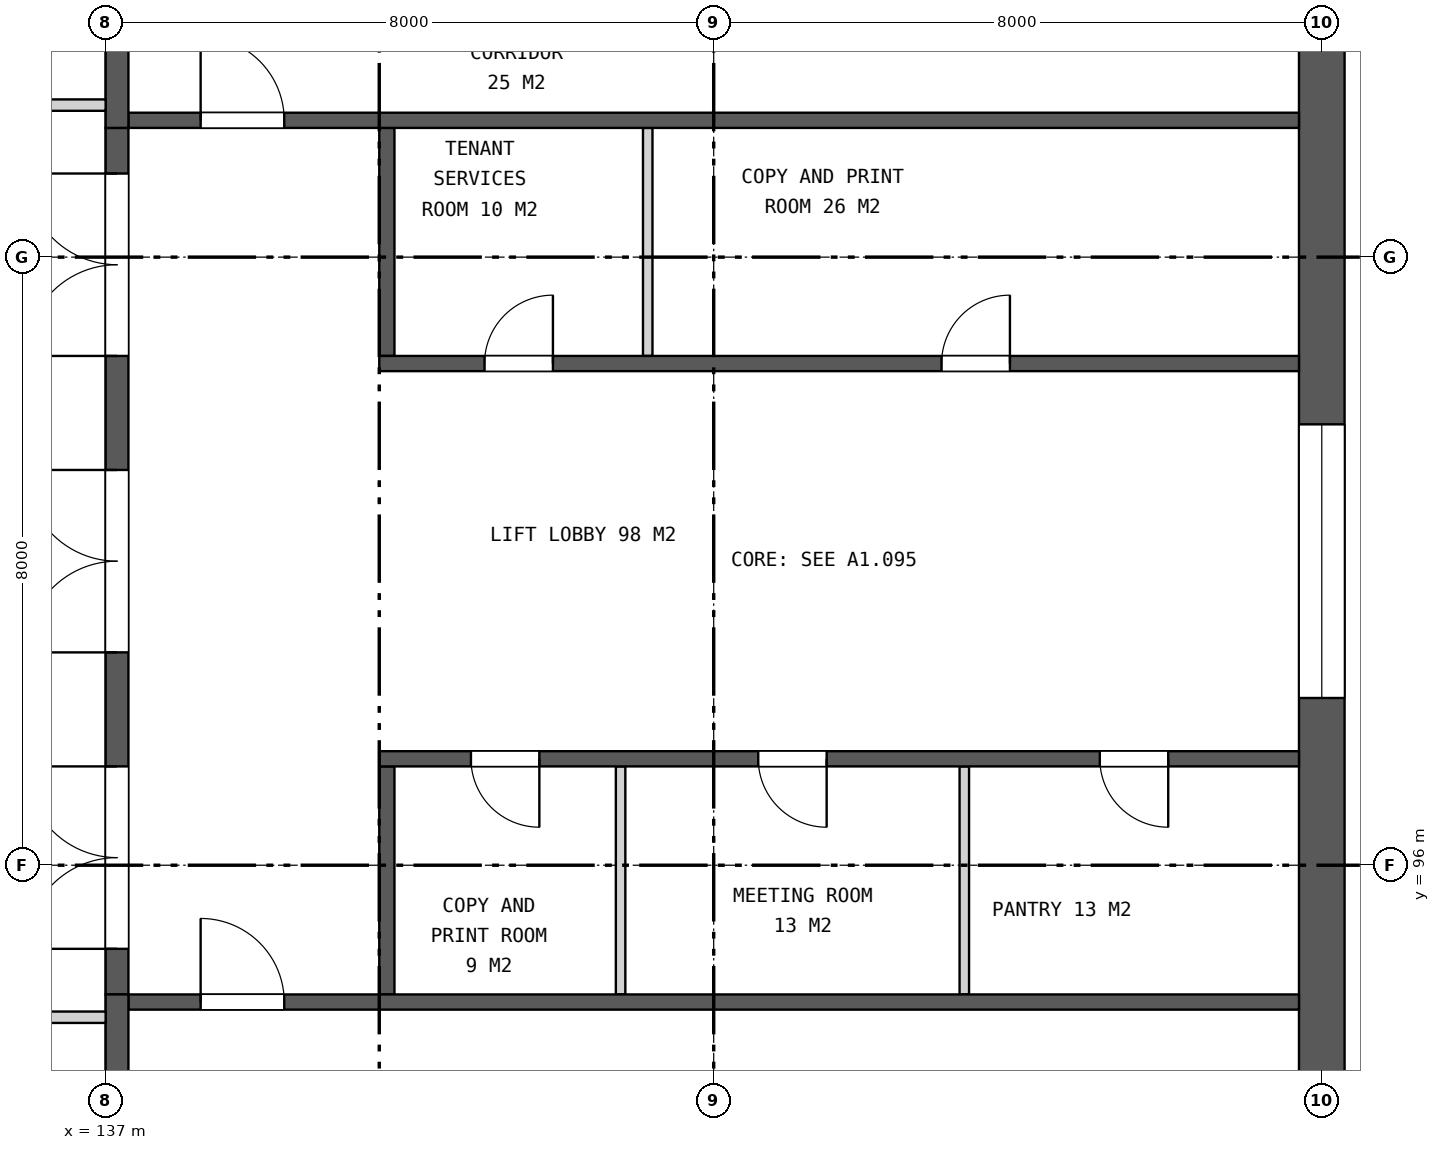
"""IFC4 building model, lengths in metres.
Left out: names, types, materials, properties, quantities, classifications, styles, units other than length and angle.
Written with IfcOpenShell. Run it as: python <this file> out.ifc"""

import sys

from ifc_helpers import new_model, si_unit, direction, frame, frame_2d, origin, place, context, subcontext, project, spatial, rectangle, extrude, element, fill, save


model = new_model("IFC4")
c1 = context("Model", 3, precision=1e-05, world=origin(), true_north=direction((0.0, 1.0)))
c2 = subcontext(c1, "Body", "Model", "MODEL_VIEW")
j1 = project(units=[si_unit("LENGTHUNIT", "METRE"), si_unit("PLANEANGLEUNIT", "RADIAN")], contexts=[c1])
p1 = place(None, origin())
s1 = spatial("IfcSite", under=j1, at=p1, CompositionType="ELEMENT")
p2 = place(p1, origin())
s2 = spatial("IfcBuilding", under=s1, at=p2, CompositionType="ELEMENT")
p3 = place(p2, frame((0.0, 0.0, 233.5)))
s3 = spatial("IfcBuildingStorey", under=s2, at=p3, CompositionType="ELEMENT", Elevation=233.5)
p4 = place(p3, frame((153.0, 88.3, 0.0), z_axis=(0.0, 0.0, 1.0), x_axis=(0.0, 1.0, 0.0)))
e1 = element("IfcWall", 1, at=p4, inside=s3, PredefinedType="SHEAR", context=c2, shape_type="SweptSolid", body=[
    extrude(rectangle(XDim=23.4, YDim=0.6, at=frame_2d((11.7, 0.0))), origin(), (0.0, 0.0, 1.0), 4.2),
])
p5 = place(p4, frame((9.9, 0.0, 0.15)))
e2 = element("IfcOpeningElement", 2, at=p5, cuts=e1, PredefinedType="OPENING", context=c2, shape_type="SweptSolid", body=[
    extrude(rectangle(XDim=3.6, YDim=3.0, at=frame_2d((1.8, 1.5))), frame((0.0, 0.31, 0.0), z_axis=(0.0, -1.0, 0.0), x_axis=(1.0, 0.0, 0.0)), (0.0, 0.0, 1.0), 0.62),
])
p6 = place(p3, frame((137.15, 94.3, 0.0), z_axis=(0.0, 0.0, 1.0), x_axis=(0.0, 1.0, 0.0)))
e3 = element("IfcWall", 3, at=p6, inside=s3, PredefinedType="SHEAR", context=c2, shape_type="SweptSolid", body=[
    extrude(rectangle(XDim=11.4, YDim=0.3, at=frame_2d((5.7, 0.0))), origin(), (0.0, 0.0, 1.0), 4.2),
])
p7 = place(p6, frame((0.6, 0.0, 0.0)))
e4 = element("IfcOpeningElement", 4, at=p7, cuts=e3, PredefinedType="OPENING", context=c2, shape_type="SweptSolid", body=[
    extrude(rectangle(XDim=2.4, YDim=2.4, at=frame_2d((1.2, 1.2))), frame((0.0, 0.16, 0.0), z_axis=(0.0, -1.0, 0.0), x_axis=(1.0, 0.0, 0.0)), (0.0, 0.0, 1.0), 0.32),
])
p8 = place(p6, frame((4.5, 0.0, 0.0)))
e5 = element("IfcOpeningElement", 5, at=p8, cuts=e3, PredefinedType="OPENING", context=c2, shape_type="SweptSolid", body=[
    extrude(rectangle(XDim=2.4, YDim=2.4, at=frame_2d((1.2, 1.2))), frame((0.0, 0.16, 0.0), z_axis=(0.0, -1.0, 0.0), x_axis=(1.0, 0.0, 0.0)), (0.0, 0.0, 1.0), 0.32),
])
p9 = place(p6, frame((8.4, 0.0, 0.0)))
e6 = element("IfcOpeningElement", 6, at=p9, cuts=e3, PredefinedType="OPENING", context=c2, shape_type="SweptSolid", body=[
    extrude(rectangle(XDim=2.4, YDim=2.4, at=frame_2d((1.2, 1.2))), frame((0.0, 0.16, 0.0), z_axis=(0.0, -1.0, 0.0), x_axis=(1.0, 0.0, 0.0)), (0.0, 0.0, 1.0), 0.32),
])
p10 = place(p3, frame((140.7, 102.7, 0.0), z_axis=(0.0, 0.0, 1.0), x_axis=(0.0, 1.0, 0.0)))
e7 = element("IfcWall", 7, at=p10, inside=s3, PredefinedType="SHEAR", context=c2, shape_type="SweptSolid", body=[
    extrude(rectangle(XDim=3.0, YDim=0.2, at=frame_2d((1.5, 0.0))), origin(), (0.0, 0.0, 1.0), 4.2),
])
p11 = place(p3, frame((144.132, 102.7, 0.0), z_axis=(0.0, 0.0, 1.0), x_axis=(0.0, 1.0, 0.0)))
e8 = element("IfcWall", 8, at=p11, inside=s3, PredefinedType="PARTITIONING", context=c2, shape_type="SweptSolid", body=[
    extrude(rectangle(XDim=3.0, YDim=0.125, at=frame_2d((1.5, 0.0))), origin(), (0.0, 0.0, 1.0), 4.2),
])
p12 = place(p3, frame((140.6, 102.6, 0.0), z_axis=(0.0, 0.0, 1.0), x_axis=(1.0, 0.0, 0.0)))
e9 = element("IfcWall", 9, at=p12, inside=s3, PredefinedType="SHEAR", context=c2, shape_type="SweptSolid", body=[
    extrude(rectangle(XDim=12.1, YDim=0.2, at=frame_2d((6.05, 0.0))), origin(), (0.0, 0.0, 1.0), 4.2),
])
p13 = place(p12, frame((1.385, 0.0, 0.0)))
e10 = element("IfcOpeningElement", 10, at=p13, cuts=e9, PredefinedType="OPENING", context=c2, shape_type="SweptSolid", body=[
    extrude(rectangle(XDim=0.9, YDim=2.1, at=frame_2d((0.45, 1.05))), frame((0.0, 0.11, 0.0), z_axis=(0.0, -1.0, 0.0), x_axis=(1.0, 0.0, 0.0)), (0.0, 0.0, 1.0), 0.22),
])
p14 = place(p12, frame((7.397, 0.0, 0.0)))
e11 = element("IfcOpeningElement", 11, at=p14, cuts=e9, PredefinedType="OPENING", context=c2, shape_type="SweptSolid", body=[
    extrude(rectangle(XDim=0.9, YDim=2.1, at=frame_2d((0.45, 1.05))), frame((0.0, 0.11, 0.0), z_axis=(0.0, -1.0, 0.0), x_axis=(1.0, 0.0, 0.0)), (0.0, 0.0, 1.0), 0.22),
])
p15 = place(p3, frame((140.7, 94.3, 0.0), z_axis=(0.0, 0.0, 1.0), x_axis=(0.0, 1.0, 0.0)))
e12 = element("IfcWall", 12, at=p15, inside=s3, PredefinedType="SHEAR", context=c2, shape_type="SweptSolid", body=[
    extrude(rectangle(XDim=3.0, YDim=0.2, at=frame_2d((1.5, 0.0))), origin(), (0.0, 0.0, 1.0), 4.2),
])
for number, where, z_axis, x_axis in (
    (13, (143.775, 94.3, 0.0), (0.0, 0.0, 1.0), (0.0, 1.0, 0.0)),
    (14, (148.297, 94.3, 0.0), (0.0, 0.0, 1.0), (0.0, 1.0, 0.0)),
):
    element("IfcWall", number, at=place(p3, frame(where, z_axis=z_axis, x_axis=x_axis)), inside=s3, PredefinedType="PARTITIONING", context=c2, shape_type="SweptSolid", body=[
        extrude(rectangle(XDim=3.0, YDim=0.125, at=frame_2d((1.5, 0.0))), origin(), (0.0, 0.0, 1.0), 4.2),
    ])
p16 = place(p3, frame((140.6, 97.4, 0.0), z_axis=(0.0, 0.0, 1.0), x_axis=(1.0, 0.0, 0.0)))
e15 = element("IfcWall", 15, at=p16, inside=s3, PredefinedType="SHEAR", context=c2, shape_type="SweptSolid", body=[
    extrude(rectangle(XDim=12.1, YDim=0.2, at=frame_2d((6.05, 0.0))), origin(), (0.0, 0.0, 1.0), 4.2),
])
p17 = place(p16, frame((1.206, 0.0, 0.0)))
e16 = element("IfcOpeningElement", 16, at=p17, cuts=e15, PredefinedType="OPENING", context=c2, shape_type="SweptSolid", body=[
    extrude(rectangle(XDim=0.9, YDim=2.1, at=frame_2d((0.45, 1.05))), frame((0.0, 0.11, 0.0), z_axis=(0.0, -1.0, 0.0), x_axis=(1.0, 0.0, 0.0)), (0.0, 0.0, 1.0), 0.22),
])
p18 = place(p16, frame((4.986, 0.0, 0.0)))
e17 = element("IfcOpeningElement", 17, at=p18, cuts=e15, PredefinedType="OPENING", context=c2, shape_type="SweptSolid", body=[
    extrude(rectangle(XDim=0.9, YDim=2.1, at=frame_2d((0.45, 1.05))), frame((0.0, 0.11, 0.0), z_axis=(0.0, -1.0, 0.0), x_axis=(1.0, 0.0, 0.0)), (0.0, 0.0, 1.0), 0.22),
])
p19 = place(p16, frame((9.48, 0.0, 0.0)))
e18 = element("IfcOpeningElement", 18, at=p19, cuts=e15, PredefinedType="OPENING", context=c2, shape_type="SweptSolid", body=[
    extrude(rectangle(XDim=0.9, YDim=2.1, at=frame_2d((0.45, 1.05))), frame((0.0, 0.11, 0.0), z_axis=(0.0, -1.0, 0.0), x_axis=(1.0, 0.0, 0.0)), (0.0, 0.0, 1.0), 0.22),
])
p20 = place(p3, frame((137.3, 105.8, 0.0), z_axis=(0.0, 0.0, 1.0), x_axis=(1.0, 0.0, 0.0)))
e19 = element("IfcWall", 19, at=p20, inside=s3, PredefinedType="SHEAR", context=c2, shape_type="SweptSolid", body=[
    extrude(rectangle(XDim=15.4, YDim=0.2, at=frame_2d((7.7, 0.0))), origin(), (0.0, 0.0, 1.0), 4.2),
])
p21 = place(p20, frame((0.95, 0.0, 0.0)))
e20 = element("IfcOpeningElement", 20, at=p21, cuts=e19, PredefinedType="OPENING", context=c2, shape_type="SweptSolid", body=[
    extrude(rectangle(XDim=1.1, YDim=2.1, at=frame_2d((0.55, 1.05))), frame((0.0, 0.11, 0.0), z_axis=(0.0, -1.0, 0.0), x_axis=(1.0, 0.0, 0.0)), (0.0, 0.0, 1.0), 0.22),
])
p22 = place(p3, frame((137.15, 105.7, 0.0), z_axis=(0.0, 0.0, 1.0), x_axis=(0.0, 1.0, 0.0)))
e21 = element("IfcWall", 21, at=p22, inside=s3, PredefinedType="SHEAR", context=c2, shape_type="SweptSolid", body=[
    extrude(rectangle(XDim=6.0, YDim=0.3, at=frame_2d((3.0, 0.0))), origin(), (0.0, 0.0, 1.0), 4.2),
])
p23 = place(p3, frame((137.3, 94.2, 0.0), z_axis=(0.0, 0.0, 1.0), x_axis=(1.0, 0.0, 0.0)))
e22 = element("IfcWall", 22, at=p23, inside=s3, PredefinedType="SHEAR", context=c2, shape_type="SweptSolid", body=[
    extrude(rectangle(XDim=15.4, YDim=0.2, at=frame_2d((7.7, 0.0))), origin(), (0.0, 0.0, 1.0), 4.2),
])
p24 = place(p23, frame((0.95, 0.0, 0.0)))
e23 = element("IfcOpeningElement", 23, at=p24, cuts=e22, PredefinedType="OPENING", context=c2, shape_type="SweptSolid", body=[
    extrude(rectangle(XDim=1.1, YDim=2.1, at=frame_2d((0.55, 1.05))), frame((0.0, 0.11, 0.0), z_axis=(0.0, -1.0, 0.0), x_axis=(1.0, 0.0, 0.0)), (0.0, 0.0, 1.0), 0.22),
])
p25 = place(p3, frame((137.15, 88.3, 0.0), z_axis=(0.0, 0.0, 1.0), x_axis=(0.0, 1.0, 0.0)))
e24 = element("IfcWall", 24, at=p25, inside=s3, PredefinedType="SHEAR", context=c2, shape_type="SweptSolid", body=[
    extrude(rectangle(XDim=6.0, YDim=0.3, at=frame_2d((3.0, 0.0))), origin(), (0.0, 0.0, 1.0), 4.2),
])
for number, where, z_axis, x_axis in (
    (25, (131.475, 94.0, 0.0), (0.0, 0.0, 1.0), (1.0, 0.0, 0.0)),
    (26, (131.475, 106.0, 0.0), (0.0, 0.0, 1.0), (1.0, 0.0, 0.0)),
):
    element("IfcWall", number, at=place(p3, frame(where, z_axis=z_axis, x_axis=x_axis)), inside=s3, PredefinedType="PARTITIONING", context=c2, shape_type="SweptSolid", body=[
        extrude(rectangle(XDim=5.525, YDim=0.15, at=frame_2d((2.762, 0.0))), origin(), (0.0, 0.0, 1.0), 3.255),
    ])
p26 = place(p5, origin())
e27 = element("IfcWindow", 27, at=p26, inside=s3, PartitioningType="SINGLE_PANEL", PredefinedType="WINDOW", context=c2, shape_type="SweptSolid", body=[
    extrude(rectangle(XDim=3.6, YDim=3.0, at=frame_2d((1.8, 1.5))), frame((0.0, 0.03, 0.0), z_axis=(0.0, -1.0, 0.0), x_axis=(1.0, 0.0, 0.0)), (0.0, 0.0, 1.0), 0.06),
])
fill(e2, e27)
p27 = place(p7, origin())
e28 = element("IfcDoor", 28, at=p27, inside=s3, OperationType="DOUBLE_DOOR_SINGLE_SWING", PredefinedType="DOOR", context=c2, shape_type="SweptSolid", body=[
    extrude(rectangle(XDim=2.4, YDim=2.4, at=frame_2d((1.2, 1.2))), frame((0.0, 0.025, 0.0), z_axis=(0.0, -1.0, 0.0), x_axis=(1.0, 0.0, 0.0)), (0.0, 0.0, 1.0), 0.05),
])
fill(e4, e28)
p28 = place(p8, origin())
e29 = element("IfcDoor", 29, at=p28, inside=s3, OperationType="DOUBLE_DOOR_SINGLE_SWING", PredefinedType="DOOR", context=c2, shape_type="SweptSolid", body=[
    extrude(rectangle(XDim=2.4, YDim=2.4, at=frame_2d((1.2, 1.2))), frame((0.0, 0.025, 0.0), z_axis=(0.0, -1.0, 0.0), x_axis=(1.0, 0.0, 0.0)), (0.0, 0.0, 1.0), 0.05),
])
fill(e5, e29)
p29 = place(p9, origin())
e30 = element("IfcDoor", 30, at=p29, inside=s3, OperationType="DOUBLE_DOOR_SINGLE_SWING", PredefinedType="DOOR", context=c2, shape_type="SweptSolid", body=[
    extrude(rectangle(XDim=2.4, YDim=2.4, at=frame_2d((1.2, 1.2))), frame((0.0, 0.025, 0.0), z_axis=(0.0, -1.0, 0.0), x_axis=(1.0, 0.0, 0.0)), (0.0, 0.0, 1.0), 0.05),
])
fill(e6, e30)
p30 = place(p13, origin())
e31 = element("IfcDoor", 31, at=p30, inside=s3, OperationType="SINGLE_SWING_RIGHT", PredefinedType="DOOR", context=c2, shape_type="SweptSolid", body=[
    extrude(rectangle(XDim=0.9, YDim=2.1, at=frame_2d((0.45, 1.05))), frame((0.0, 0.025, 0.0), z_axis=(0.0, -1.0, 0.0), x_axis=(1.0, 0.0, 0.0)), (0.0, 0.0, 1.0), 0.05),
])
fill(e10, e31)
p31 = place(p14, origin())
e32 = element("IfcDoor", 32, at=p31, inside=s3, OperationType="SINGLE_SWING_RIGHT", PredefinedType="DOOR", context=c2, shape_type="SweptSolid", body=[
    extrude(rectangle(XDim=0.9, YDim=2.1, at=frame_2d((0.45, 1.05))), frame((0.0, 0.025, 0.0), z_axis=(0.0, -1.0, 0.0), x_axis=(1.0, 0.0, 0.0)), (0.0, 0.0, 1.0), 0.05),
])
fill(e11, e32)
p32 = place(p17, frame((0.9, 0.0, 0.0), z_axis=(0.0, 0.0, 1.0), x_axis=(-1.0, 0.0, 0.0)))
e33 = element("IfcDoor", 33, at=p32, inside=s3, OperationType="SINGLE_SWING_LEFT", PredefinedType="DOOR", context=c2, shape_type="SweptSolid", body=[
    extrude(rectangle(XDim=0.9, YDim=2.1, at=frame_2d((0.45, 1.05))), frame((0.0, 0.025, 0.0), z_axis=(0.0, -1.0, 0.0), x_axis=(1.0, 0.0, 0.0)), (0.0, 0.0, 1.0), 0.05),
])
fill(e16, e33)
p33 = place(p18, frame((0.9, 0.0, 0.0), z_axis=(0.0, 0.0, 1.0), x_axis=(-1.0, 0.0, 0.0)))
e34 = element("IfcDoor", 34, at=p33, inside=s3, OperationType="SINGLE_SWING_LEFT", PredefinedType="DOOR", context=c2, shape_type="SweptSolid", body=[
    extrude(rectangle(XDim=0.9, YDim=2.1, at=frame_2d((0.45, 1.05))), frame((0.0, 0.025, 0.0), z_axis=(0.0, -1.0, 0.0), x_axis=(1.0, 0.0, 0.0)), (0.0, 0.0, 1.0), 0.05),
])
fill(e17, e34)
p34 = place(p19, frame((0.9, 0.0, 0.0), z_axis=(0.0, 0.0, 1.0), x_axis=(-1.0, 0.0, 0.0)))
e35 = element("IfcDoor", 35, at=p34, inside=s3, OperationType="SINGLE_SWING_LEFT", PredefinedType="DOOR", context=c2, shape_type="SweptSolid", body=[
    extrude(rectangle(XDim=0.9, YDim=2.1, at=frame_2d((0.45, 1.05))), frame((0.0, 0.025, 0.0), z_axis=(0.0, -1.0, 0.0), x_axis=(1.0, 0.0, 0.0)), (0.0, 0.0, 1.0), 0.05),
])
fill(e18, e35)
p35 = place(p21, origin())
e36 = element("IfcDoor", 36, at=p35, inside=s3, OperationType="SINGLE_SWING_LEFT", PredefinedType="DOOR", context=c2, shape_type="SweptSolid", body=[
    extrude(rectangle(XDim=1.1, YDim=2.1, at=frame_2d((0.55, 1.05))), frame((0.0, 0.025, 0.0), z_axis=(0.0, -1.0, 0.0), x_axis=(1.0, 0.0, 0.0)), (0.0, 0.0, 1.0), 0.05),
])
fill(e20, e36)
p36 = place(p24, origin())
e37 = element("IfcDoor", 37, at=p36, inside=s3, OperationType="SINGLE_SWING_LEFT", PredefinedType="DOOR", context=c2, shape_type="SweptSolid", body=[
    extrude(rectangle(XDim=1.1, YDim=2.1, at=frame_2d((0.55, 1.05))), frame((0.0, 0.025, 0.0), z_axis=(0.0, -1.0, 0.0), x_axis=(1.0, 0.0, 0.0)), (0.0, 0.0, 1.0), 0.05),
])
fill(e23, e37)
save(model, sys.argv[1])
